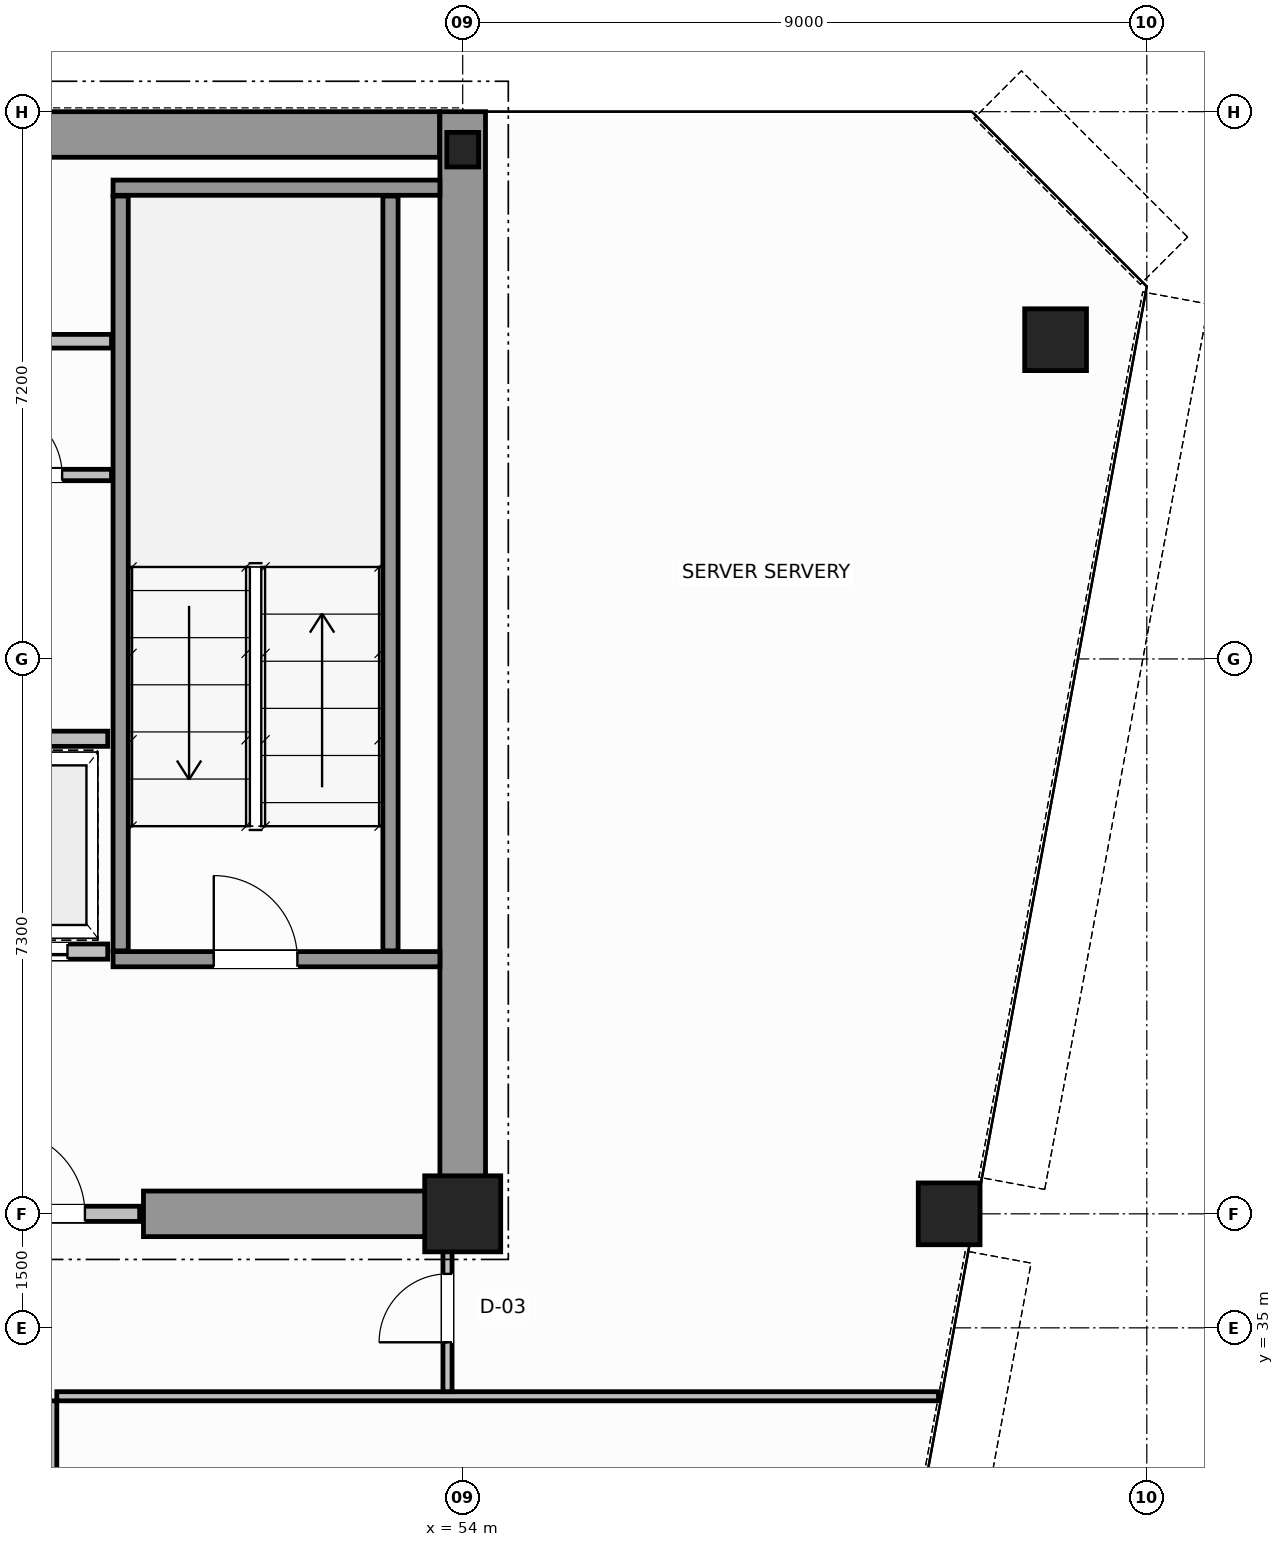
"""IFC4 building model, lengths in metres.
Left out: names, types, materials, properties, quantities, classifications, styles, units other than length and angle.
Written with IfcOpenShell. Run it as: python <this file> out.ifc"""

import sys

from ifc_helpers import new_model, si_unit, direction, frame, frame_2d, origin, origin_2d, place, context, subcontext, project, spatial, rectangle, hollow_circle, i_section, extrude, source, transform, mapped, element, fill, save


model = new_model("IFC4")
c1 = context("Model", 3, precision=1e-05, world=origin(), true_north=direction((0.0, 1.0)))
c2 = subcontext(c1, "Body", "Model", "MODEL_VIEW")
j1 = project(units=[si_unit("LENGTHUNIT", "METRE"), si_unit("PLANEANGLEUNIT", "RADIAN")], contexts=[c1])
p1 = place(None, origin())
s1 = spatial("IfcSite", under=j1, at=p1, CompositionType="ELEMENT")
p2 = place(p1, origin())
s2 = spatial("IfcBuilding", under=s1, at=p2, CompositionType="ELEMENT")
p3 = place(p2, frame((0.0, 0.0, 210.8)))
s3 = spatial("IfcBuildingStorey", under=s2, at=p3, CompositionType="ELEMENT", Elevation=210.8)
m1 = source(origin(), c2, "Body", "SweptSolid", [
    extrude(rectangle(XDim=1.0, YDim=1.0, at=origin_2d()), origin(), (0.0, 0.0, 1.0), 3.8),
])
p4 = place(p3, frame((54.0, 36.5, 0.0), z_axis=(0.0, 0.0, 1.0), x_axis=(1.0, 0.0, 0.0)))
e1 = element("IfcColumn", 1, at=p4, inside=s3, PredefinedType="COLUMN", context=c2, shape_type="MappedRepresentation", body=[
    mapped(m1, transform((0.0, 0.0, 0.0), scale=1.0)),
])
m2 = source(origin(), c2, "Body", "SweptSolid", [
    extrude(i_section(OverallWidth=0.418, OverallDepth=0.455, WebThickness=0.042, FlangeThickness=0.058, FilletRadius=0.015, at=origin_2d()), origin(), (0.0, 0.0, 1.0), 3.8),
])
p5 = place(p3, frame((54.0, 50.5, 0.0), z_axis=(0.0, 0.0, 1.0), x_axis=(1.0, 0.0, 0.0)))
e2 = element("IfcColumn", 2, at=p5, inside=s3, PredefinedType="COLUMN", context=c2, shape_type="MappedRepresentation", body=[
    mapped(m2, transform((0.0, 0.0, 0.0), scale=1.0)),
])
m3 = source(origin(), c2, "Body", "SweptSolid", [
    extrude(hollow_circle(Radius=0.406, WallThickness=0.04, at=origin_2d()), origin(), (0.0, 0.0, 1.0), 3.8),
])
for number, where, z_axis, x_axis in (
    (3, (61.8, 48.0, 0.0), (0.0, 0.0, 1.0), (1.0, 0.0, 0.0)),
    (4, (60.4, 36.5, 0.0), (0.0, 0.0, 1.0), (1.0, 0.0, 0.0)),
):
    element("IfcColumn", number, at=place(p3, frame(where, z_axis=z_axis, x_axis=x_axis)), inside=s3, PredefinedType="COLUMN", context=c2, shape_type="MappedRepresentation", body=[
        mapped(m3, transform((0.0, 0.0, 0.0), scale=1.0)),
    ])
p6 = place(p3, frame((34.002, 50.7, 0.0), z_axis=(0.0, 0.0, 1.0), x_axis=(1.0, 0.0, 0.0)))
e5 = element("IfcWall", 5, at=p6, inside=s3, PredefinedType="SHEAR", context=c2, shape_type="SweptSolid", body=[
    extrude(rectangle(XDim=19.694, YDim=0.6, at=frame_2d((9.847, 0.0))), origin(), (0.0, 0.0, 1.0), 3.8),
])
p7 = place(p3, frame((54.0, 36.5, 0.0), z_axis=(0.0, 0.0, 1.0), x_axis=(0.0, 1.0, 0.0)))
e6 = element("IfcWall", 6, at=p7, inside=s3, PredefinedType="SHEAR", context=c2, shape_type="SweptSolid", body=[
    extrude(rectangle(XDim=14.5, YDim=0.6, at=frame_2d((7.25, 0.0))), origin(), (0.0, 0.0, 1.0), 3.8),
])
p8 = place(p3, frame((49.8, 36.5, 0.0), z_axis=(0.0, 0.0, 1.0), x_axis=(1.0, 0.0, 0.0)))
e7 = element("IfcWall", 7, at=p8, inside=s3, PredefinedType="SHEAR", context=c2, shape_type="SweptSolid", body=[
    extrude(rectangle(XDim=3.88, YDim=0.6, at=frame_2d((1.94, 0.0))), origin(), (0.0, 0.0, 1.0), 2.58),
])
p9 = place(p3, frame((49.4, 39.85, 0.0), z_axis=(0.0, 0.0, 1.0), x_axis=(1.0, 0.0, 0.0)))
e8 = element("IfcWall", 8, at=p9, inside=s3, PredefinedType="SOLIDWALL", context=c2, shape_type="SweptSolid", body=[
    extrude(rectangle(XDim=4.3, YDim=0.2, at=frame_2d((2.15, 0.0))), origin(), (0.0, 0.0, 1.0), 3.8),
])
p10 = place(p9, frame((1.325, 0.0, 0.0)))
e9 = element("IfcOpeningElement", 9, at=p10, cuts=e8, PredefinedType="OPENING", context=c2, shape_type="SweptSolid", body=[
    extrude(rectangle(XDim=1.1, YDim=2.15, at=frame_2d((0.55, 1.075))), frame((0.0, 0.11, 0.0), z_axis=(0.0, -1.0, 0.0), x_axis=(1.0, 0.0, 0.0)), (0.0, 0.0, 1.0), 0.22),
])
p11 = place(p3, frame((49.4, 50.0, 0.0), z_axis=(0.0, 0.0, 1.0), x_axis=(1.0, 0.0, 0.0)))
e10 = element("IfcWall", 10, at=p11, inside=s3, PredefinedType="SOLIDWALL", context=c2, shape_type="SweptSolid", body=[
    extrude(rectangle(XDim=4.3, YDim=0.2, at=frame_2d((2.15, 0.0))), origin(), (0.0, 0.0, 1.0), 3.8),
])
for number, where, z_axis, x_axis in (
    (11, (49.5, 39.96, 0.0), (0.0, 0.0, 1.0), (0.0, 1.0, 0.0)),
    (12, (53.05, 39.96, 0.0), (0.0, 0.0, 1.0), (0.0, 1.0, 0.0)),
):
    element("IfcWall", number, at=place(p3, frame(where, z_axis=z_axis, x_axis=x_axis)), inside=s3, PredefinedType="SOLIDWALL", context=c2, shape_type="SweptSolid", body=[
        extrude(rectangle(XDim=9.93, YDim=0.2, at=frame_2d((4.965, 0.0))), origin(), (0.0, 0.0, 1.0), 3.8),
    ])
p12 = place(p3, frame((47.28, 36.5, 0.0), z_axis=(0.0, 0.0, 1.0), x_axis=(1.0, 0.0, 0.0)))
e13 = element("IfcWall", 13, at=p12, inside=s3, PredefinedType="SOLIDWALL", context=c2, shape_type="SweptSolid", body=[
    extrude(rectangle(XDim=2.47, YDim=0.2, at=frame_2d((1.235, 0.0))), origin(), (0.0, 0.0, 1.0), 2.57),
])
p13 = place(p12, frame((0.65, 0.0, 0.0)))
e14 = element("IfcOpeningElement", 14, at=p13, cuts=e13, PredefinedType="OPENING", context=c2, shape_type="SweptSolid", body=[
    extrude(rectangle(XDim=1.1, YDim=2.15, at=frame_2d((0.55, 1.075))), frame((0.0, 0.11, 0.0), z_axis=(0.0, -1.0, 0.0), x_axis=(1.0, 0.0, 0.0)), (0.0, 0.0, 1.0), 0.22),
])
p14 = place(p3, frame((47.17, 39.95, 0.0), z_axis=(0.0, 0.0, 1.0), x_axis=(1.0, 0.0, 0.0)))
e15 = element("IfcWall", 15, at=p14, inside=s3, PredefinedType="SOLIDWALL", context=c2, shape_type="SweptSolid", body=[
    extrude(rectangle(XDim=2.16, YDim=0.2, at=frame_2d((1.08, 0.0))), origin(), (0.0, 0.0, 1.0), 3.58),
])
p15 = place(p14, frame((0.53, 0.0, 0.0)))
e16 = element("IfcOpeningElement", 16, at=p15, cuts=e15, PredefinedType="OPENING", context=c2, shape_type="SweptSolid", body=[
    extrude(rectangle(XDim=1.1, YDim=2.15, at=frame_2d((0.55, 1.075))), frame((0.0, 0.11, 0.0), z_axis=(0.0, -1.0, 0.0), x_axis=(1.0, 0.0, 0.0)), (0.0, 0.0, 1.0), 0.22),
])
p16 = place(p3, frame((47.17, 42.75, 0.0), z_axis=(0.0, 0.0, 1.0), x_axis=(1.0, 0.0, 0.0)))
e17 = element("IfcWall", 17, at=p16, inside=s3, PredefinedType="SOLIDWALL", context=c2, shape_type="SweptSolid", body=[
    extrude(rectangle(XDim=2.16, YDim=0.2, at=frame_2d((1.08, 0.0))), origin(), (0.0, 0.0, 1.0), 3.58),
])
p17 = place(p3, frame((47.28, 46.22, 0.0), z_axis=(0.0, 0.0, 1.0), x_axis=(1.0, 0.0, 0.0)))
e18 = element("IfcWall", 18, at=p17, inside=s3, PredefinedType="PARTITIONING", context=c2, shape_type="SweptSolid", body=[
    extrude(rectangle(XDim=2.1, YDim=0.15, at=frame_2d((1.05, 0.0))), origin(), (0.0, 0.0, 1.0), 3.58),
])
p18 = place(p17, frame((0.55, 0.0, 0.0)))
e19 = element("IfcOpeningElement", 19, at=p18, cuts=e18, PredefinedType="OPENING", context=c2, shape_type="SweptSolid", body=[
    extrude(rectangle(XDim=0.9, YDim=2.1, at=frame_2d((0.45, 1.05))), frame((0.0, 0.085, 0.0), z_axis=(0.0, -1.0, 0.0), x_axis=(1.0, 0.0, 0.0)), (0.0, 0.0, 1.0), 0.17),
])
p19 = place(p3, frame((40.62, 47.98, 0.0), z_axis=(0.0, 0.0, 1.0), x_axis=(1.0, 0.0, 0.0)))
e20 = element("IfcWall", 20, at=p19, inside=s3, PredefinedType="PLUMBINGWALL", context=c2, shape_type="SweptSolid", body=[
    extrude(rectangle(XDim=8.76, YDim=0.18, at=frame_2d((4.38, 0.0))), origin(), (0.0, 0.0, 1.0), 3.58),
])
p20 = place(p19, frame((3.8, 0.0, 0.0)))
e21 = element("IfcOpeningElement", 21, at=p20, cuts=e20, PredefinedType="OPENING", context=c2, shape_type="SweptSolid", body=[
    extrude(rectangle(XDim=0.9, YDim=2.15, at=frame_2d((0.45, 1.075))), frame((0.0, 0.1, 0.0), z_axis=(0.0, -1.0, 0.0), x_axis=(1.0, 0.0, 0.0)), (0.0, 0.0, 1.0), 0.2),
])
p21 = place(p3, frame((48.66, 34.1, 0.0), z_axis=(0.0, 0.0, 1.0), x_axis=(1.0, 0.0, 0.0)))
e22 = element("IfcWall", 22, at=p21, inside=s3, PredefinedType="PARTITIONING", context=c2, shape_type="SweptSolid", body=[
    extrude(rectangle(XDim=11.6, YDim=0.12, at=frame_2d((5.8, 0.0))), origin(), (0.0, 0.0, 1.0), 3.58),
])
p22 = place(p3, frame((53.8, 34.16, 0.0), z_axis=(0.0, 0.0, 1.0), x_axis=(0.0, 1.0, 0.0)))
e23 = element("IfcWall", 23, at=p22, inside=s3, PredefinedType="PARTITIONING", context=c2, shape_type="SweptSolid", body=[
    extrude(rectangle(XDim=2.28, YDim=0.12, at=frame_2d((1.14, 0.0))), origin(), (0.0, 0.0, 1.0), 3.58),
])
p23 = place(p22, frame((0.65, 0.0, 0.0)))
e24 = element("IfcOpeningElement", 24, at=p23, cuts=e23, PredefinedType="OPENING", context=c2, shape_type="SweptSolid", body=[
    extrude(rectangle(XDim=0.9, YDim=2.15, at=frame_2d((0.45, 1.075))), frame((0.0, 0.07, 0.0), z_axis=(0.0, -1.0, 0.0), x_axis=(1.0, 0.0, 0.0)), (0.0, 0.0, 1.0), 0.14),
])
p24 = place(p3, frame((48.6, 20.4, 0.0), z_axis=(0.0, 0.0, 1.0), x_axis=(0.0, 1.0, 0.0)))
e25 = element("IfcWall", 25, at=p24, inside=s3, PredefinedType="PARTITIONING", context=c2, shape_type="SweptSolid", body=[
    extrude(rectangle(XDim=13.64, YDim=0.12, at=frame_2d((6.82, 0.0))), origin(), (0.0, 0.0, 1.0), 3.58),
])
p25 = place(p24, frame((2.55, 0.0, 0.0)))
e26 = element("IfcOpeningElement", 26, at=p25, cuts=e25, PredefinedType="OPENING", context=c2, shape_type="SweptSolid", body=[
    extrude(rectangle(XDim=0.9, YDim=2.15, at=frame_2d((0.45, 1.075))), frame((0.0, 0.07, 0.0), z_axis=(0.0, -1.0, 0.0), x_axis=(1.0, 0.0, 0.0)), (0.0, 0.0, 1.0), 0.14),
])
p26 = place(p24, frame((9.37, 0.0, 0.0)))
e27 = element("IfcOpeningElement", 27, at=p26, cuts=e25, PredefinedType="OPENING", context=c2, shape_type="SweptSolid", body=[
    extrude(rectangle(XDim=0.9, YDim=2.15, at=frame_2d((0.45, 1.075))), frame((0.0, 0.07, 0.0), z_axis=(0.0, -1.0, 0.0), x_axis=(1.0, 0.0, 0.0)), (0.0, 0.0, 1.0), 0.14),
])
m4 = source(origin(), c2, "Body", "SweptSolid", [
    extrude(rectangle(XDim=1.1, YDim=2.15, at=frame_2d((0.55, 1.075))), frame((0.0, 0.025, 0.0), z_axis=(0.0, -1.0, 0.0), x_axis=(1.0, 0.0, 0.0)), (0.0, 0.0, 1.0), 0.05),
])
p27 = place(p10, origin())
e28 = element("IfcDoor", 28, at=p27, inside=s3, OperationType="SINGLE_SWING_RIGHT", PredefinedType="DOOR", context=c2, shape_type="MappedRepresentation", body=[
    mapped(m4, transform((0.0, 0.0, 0.0), scale=1.0)),
])
fill(e9, e28)
p28 = place(p13, origin())
e29 = element("IfcDoor", 29, at=p28, inside=s3, OperationType="SINGLE_SWING_LEFT", PredefinedType="DOOR", context=c2, shape_type="MappedRepresentation", body=[
    mapped(m4, transform((0.0, 0.0, 0.0), scale=1.0)),
])
fill(e14, e29)
p29 = place(p15, origin())
e30 = element("IfcDoor", 30, at=p29, inside=s3, OperationType="DOUBLE_DOOR_SLIDING", PredefinedType="DOOR", context=c2, shape_type="MappedRepresentation", body=[
    mapped(m4, transform((0.0, 0.0, 0.0), scale=1.0)),
])
fill(e16, e30)
m5 = source(origin(), c2, "Body", "SweptSolid", [
    extrude(rectangle(XDim=0.9, YDim=2.1, at=frame_2d((0.45, 1.05))), frame((0.0, 0.025, 0.0), z_axis=(0.0, -1.0, 0.0), x_axis=(1.0, 0.0, 0.0)), (0.0, 0.0, 1.0), 0.05),
])
p30 = place(p18, origin())
e31 = element("IfcDoor", 31, at=p30, inside=s3, OperationType="SINGLE_SWING_RIGHT", PredefinedType="DOOR", context=c2, shape_type="MappedRepresentation", body=[
    mapped(m5, transform((0.0, 0.0, 0.0), scale=1.0)),
])
fill(e19, e31)
m6 = source(origin(), c2, "Body", "SweptSolid", [
    extrude(rectangle(XDim=0.9, YDim=2.15, at=frame_2d((0.45, 1.075))), frame((0.0, 0.025, 0.0), z_axis=(0.0, -1.0, 0.0), x_axis=(1.0, 0.0, 0.0)), (0.0, 0.0, 1.0), 0.05),
])
p31 = place(p23, origin())
e32 = element("IfcDoor", 32, at=p31, inside=s3, OperationType="SINGLE_SWING_RIGHT", PredefinedType="DOOR", context=c2, shape_type="MappedRepresentation", body=[
    mapped(m6, transform((0.0, 0.0, 0.0), scale=1.0)),
])
fill(e24, e32)
save(model, sys.argv[1])
